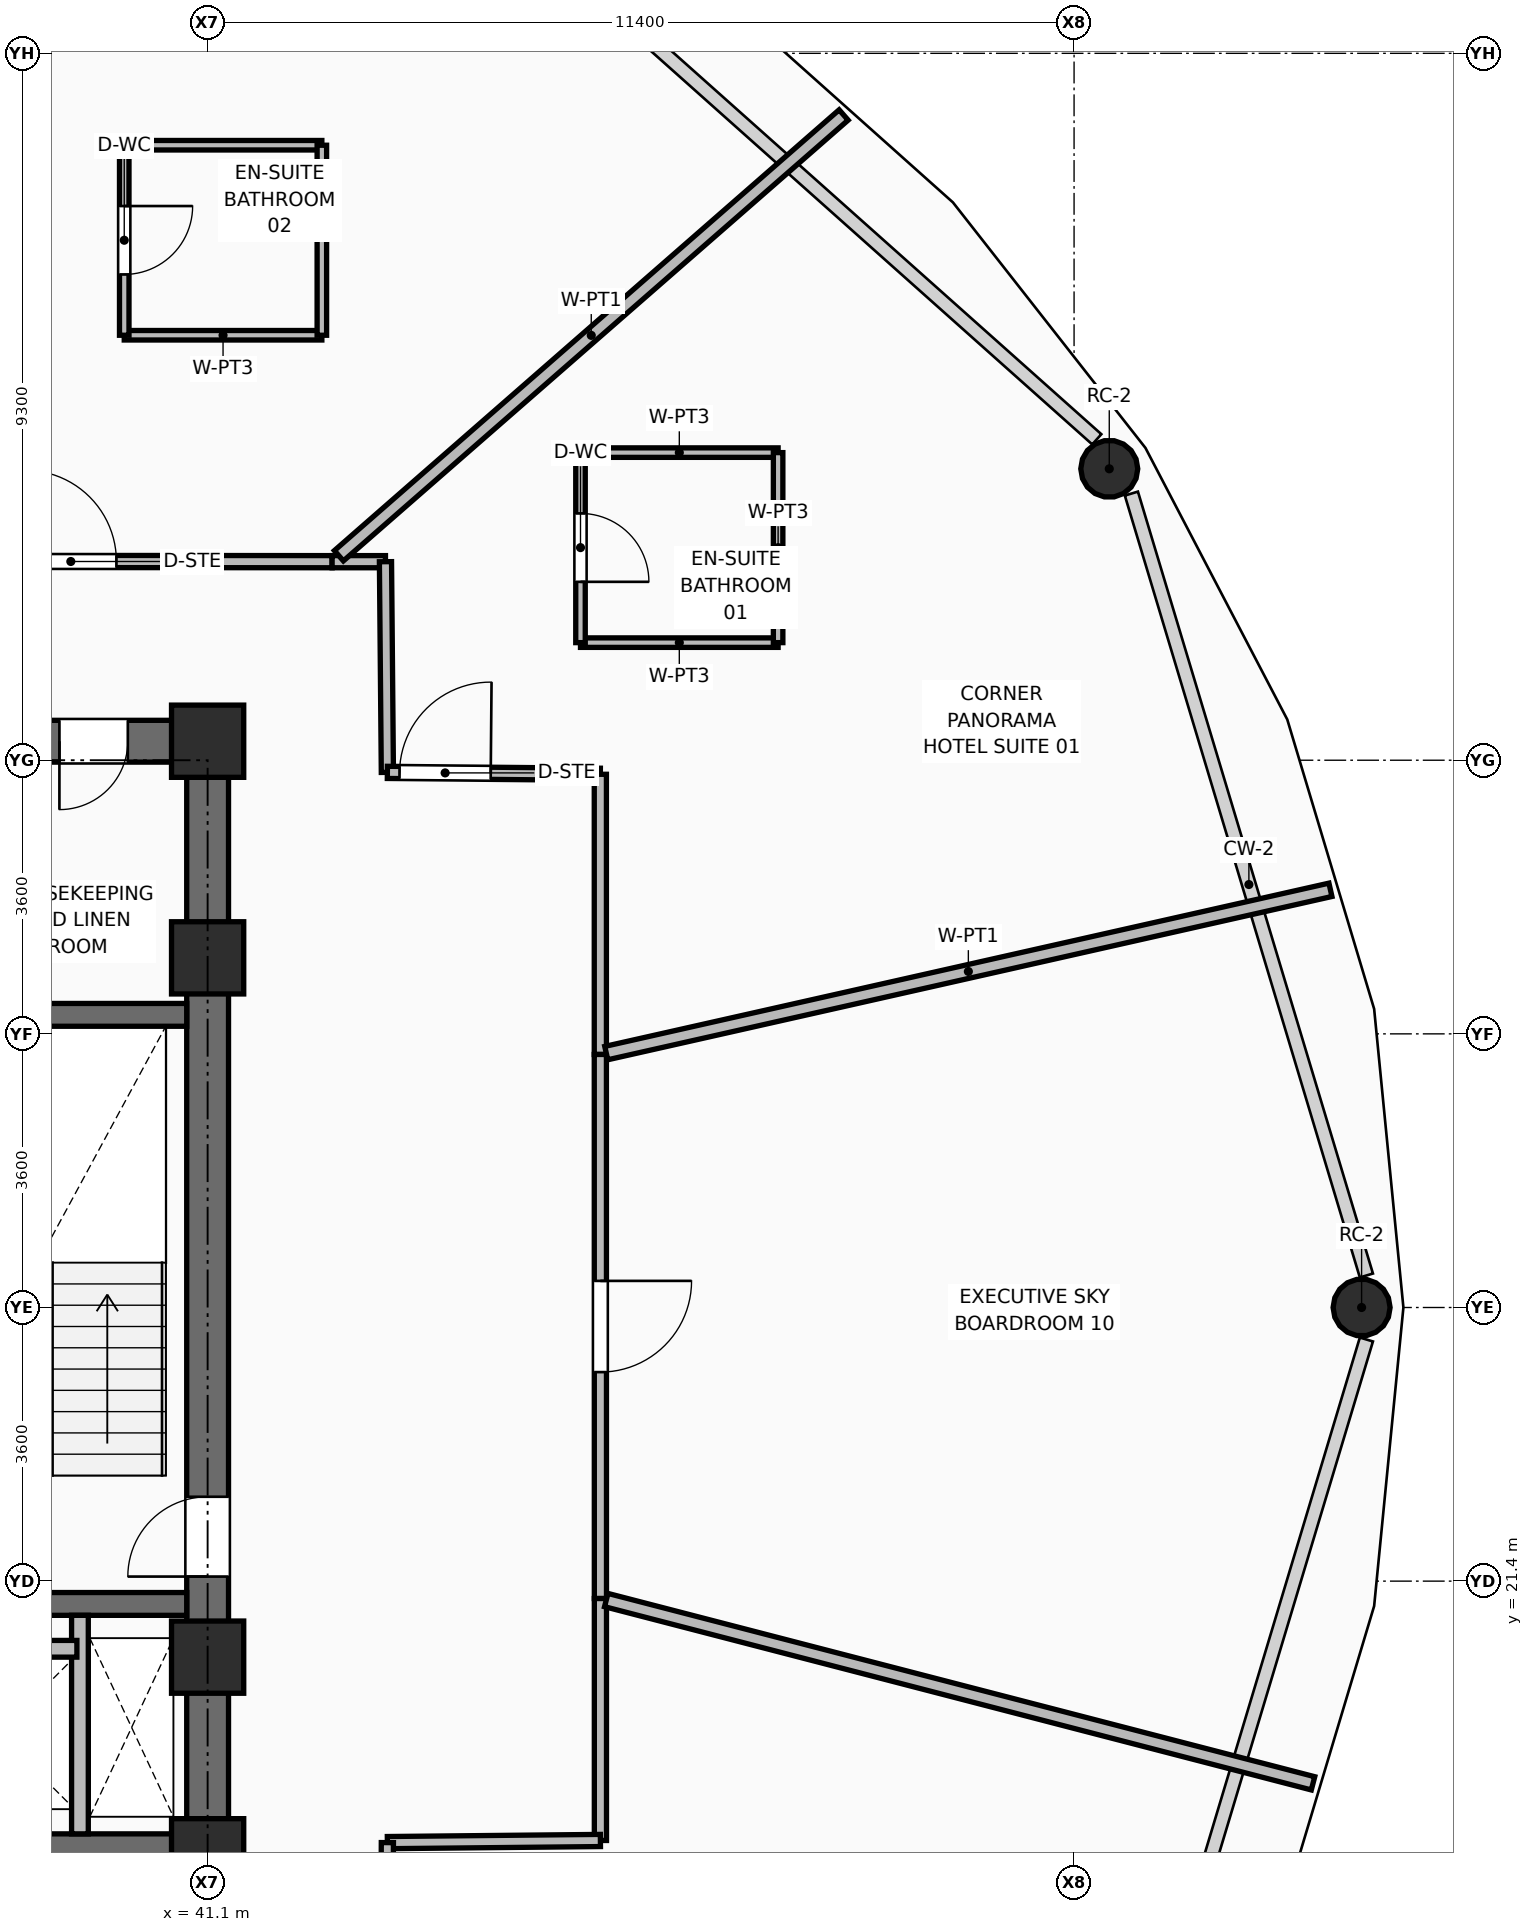
"""IFC4 building model, lengths in metres.
Left out: names, types, materials, properties, quantities, classifications, styles, units other than length and angle.
Written with IfcOpenShell. Run it as: python <this file> out.ifc"""

import sys

from ifc_helpers import new_model, si_unit, direction, frame, frame_2d, origin, origin_2d, place, context, subcontext, project, spatial, rectangle, hollow_circle, extrude, element, fill, save


model = new_model("IFC4")
c1 = context("Model", 3, precision=1e-05, world=origin(), true_north=direction((0.0, 1.0)))
c2 = subcontext(c1, "Body", "Model", "MODEL_VIEW")
j1 = project(units=[si_unit("LENGTHUNIT", "METRE"), si_unit("PLANEANGLEUNIT", "RADIAN")], contexts=[c1])
p1 = place(None, origin())
s1 = spatial("IfcSite", under=j1, at=p1, CompositionType="ELEMENT")
p2 = place(p1, origin())
s2 = spatial("IfcBuilding", under=s1, at=p2, CompositionType="ELEMENT")
p3 = place(p2, frame((0.0, 0.0, 160.95)))
s3 = spatial("IfcBuildingStorey", under=s2, at=p3, CompositionType="ELEMENT", Elevation=160.95)
for number, where, z_axis, x_axis in (
    (1, (41.1, 17.8, 0.0), (0.0, 0.0, 1.0), (1.0, 0.0, 0.0)),
    (2, (41.1, 20.4, 0.0), (0.0, 0.0, 1.0), (1.0, 0.0, 0.0)),
    (3, (41.1, 29.6, 0.0), (0.0, 0.0, 1.0), (1.0, 0.0, 0.0)),
    (4, (41.1, 32.45, 0.0), (0.0, 0.0, 1.0), (1.0, 0.0, 0.0)),
):
    element("IfcColumn", number, at=place(p3, frame(where, z_axis=z_axis, x_axis=x_axis)), inside=s3, PredefinedType="COLUMN", context=c2, shape_type="SweptSolid", body=[
        extrude(rectangle(XDim=0.95, YDim=0.95, at=origin_2d()), origin(), (0.0, 0.0, 1.0), 3.75),
    ])
p4 = place(p3, frame((56.283, 25.0, 0.0), z_axis=(-0.069040907856, 0.0, 0.997613829617), x_axis=(0.0, -1.0, 0.0)))
e5 = element("IfcColumn", 5, at=p4, inside=s3, PredefinedType="COLUMN", context=c2, shape_type="SweptSolid", body=[
    extrude(hollow_circle(Radius=0.375, WallThickness=0.035, at=origin_2d()), origin(), (0.0, 0.0, 1.0), 3.579),
])
p5 = place(p3, frame((52.963, 36.034, 0.0), z_axis=(-0.059770231888, -0.030703886244, 0.997739841216), x_axis=(0.456934981397, -0.88950009712, 0.0)))
e6 = element("IfcColumn", 6, at=p5, inside=s3, PredefinedType="COLUMN", context=c2, shape_type="SweptSolid", body=[
    extrude(hollow_circle(Radius=0.375, WallThickness=0.035, at=origin_2d()), origin(), (0.0, 0.0, 1.0), 3.578),
])
p6 = place(p3, frame((34.95, 17.8, 0.0), z_axis=(0.0, 0.0, 1.0), x_axis=(1.0, 0.0, 0.0)))
e7 = element("IfcWall", 7, at=p6, inside=s3, PredefinedType="SHEAR", context=c2, shape_type="SweptSolid", body=[
    extrude(rectangle(XDim=6.425, YDim=0.55, at=frame_2d((3.212, 0.0))), origin(), (0.0, 0.0, 1.0), 3.57),
])
p7 = place(p3, frame((21.625, 32.45, 0.0), z_axis=(0.0, 0.0, 1.0), x_axis=(1.0, 0.0, 0.0)))
e8 = element("IfcWall", 8, at=p7, inside=s3, PredefinedType="SHEAR", context=c2, shape_type="SweptSolid", body=[
    extrude(rectangle(XDim=19.75, YDim=0.55, at=frame_2d((9.875, 0.0))), origin(), (0.0, 0.0, 1.0), 3.57),
])
p8 = place(p7, frame((2.125, 0.0, 0.0)))
e9 = element("IfcOpeningElement", 9, at=p8, cuts=e8, PredefinedType="OPENING", context=c2, shape_type="SweptSolid", body=[
    extrude(rectangle(XDim=1.1, YDim=2.1, at=frame_2d((0.55, 1.05))), frame((0.0, 0.285, 0.0), z_axis=(0.0, -1.0, 0.0), x_axis=(1.0, 0.0, 0.0)), (0.0, 0.0, 1.0), 0.57),
])
p9 = place(p7, frame((15.515, 0.0, 0.0)))
e10 = element("IfcOpeningElement", 10, at=p9, cuts=e8, PredefinedType="OPENING", context=c2, shape_type="SweptSolid", body=[
    extrude(rectangle(XDim=1.0, YDim=2.1, at=frame_2d((0.5, 1.05))), frame((0.0, 0.285, 0.0), z_axis=(0.0, -1.0, 0.0), x_axis=(1.0, 0.0, 0.0)), (0.0, 0.0, 1.0), 0.57),
])
p10 = place(p7, frame((17.525, 0.0, 0.0)))
e11 = element("IfcOpeningElement", 11, at=p10, cuts=e8, PredefinedType="OPENING", context=c2, shape_type="SweptSolid", body=[
    extrude(rectangle(XDim=0.9, YDim=2.1, at=frame_2d((0.45, 1.05))), frame((0.0, 0.285, 0.0), z_axis=(0.0, -1.0, 0.0), x_axis=(1.0, 0.0, 0.0)), (0.0, 0.0, 1.0), 0.57),
])
p11 = place(p3, frame((41.1, 18.075, 0.0), z_axis=(0.0, 0.0, 1.0), x_axis=(0.0, 1.0, 0.0)))
e12 = element("IfcWall", 12, at=p11, inside=s3, PredefinedType="SHEAR", context=c2, shape_type="SweptSolid", body=[
    extrude(rectangle(XDim=14.1, YDim=0.55, at=frame_2d((7.05, 0.0))), origin(), (0.0, 0.0, 1.0), 3.57),
])
p12 = place(p11, frame((3.385, 0.0, 0.0)))
e13 = element("IfcOpeningElement", 13, at=p12, cuts=e12, PredefinedType="OPENING", context=c2, shape_type="SweptSolid", body=[
    extrude(rectangle(XDim=1.05, YDim=2.1, at=frame_2d((0.525, 1.05))), frame((0.0, 0.285, 0.0), z_axis=(0.0, -1.0, 0.0), x_axis=(1.0, 0.0, 0.0)), (0.0, 0.0, 1.0), 0.57),
])
for number, where, z_axis, x_axis in (
    (14, (37.21, 21.1, 0.0), (0.0, 0.0, 1.0), (1.0, 0.0, 0.0)),
    (15, (37.21, 28.85, 0.0), (0.0, 0.0, 1.0), (1.0, 0.0, 0.0)),
):
    element("IfcWall", number, at=place(p3, frame(where, z_axis=z_axis, x_axis=x_axis)), inside=s3, PredefinedType="SHEAR", context=c2, shape_type="SweptSolid", body=[
        extrude(rectangle(XDim=3.615, YDim=0.3, at=frame_2d((1.808, 0.0))), origin(), (0.0, 0.0, 1.0), 3.57),
    ])
p13 = place(p3, frame((39.42, 18.075, 0.0), z_axis=(0.0, 0.0, 1.0), x_axis=(0.0, 1.0, 0.0)))
e16 = element("IfcWall", 16, at=p13, inside=s3, PredefinedType="PARTITIONING", context=c2, shape_type="SweptSolid", body=[
    extrude(rectangle(XDim=2.875, YDim=0.22, at=frame_2d((1.438, 0.0))), origin(), (0.0, 0.0, 1.0), 3.55),
])
p14 = place(p3, frame((37.14, 20.51, 0.0), z_axis=(0.0, 0.0, 1.0), x_axis=(1.0, 0.0, 0.0)))
e17 = element("IfcWall", 17, at=p14, inside=s3, PredefinedType="PARTITIONING", context=c2, shape_type="SweptSolid", body=[
    extrude(rectangle(XDim=2.24, YDim=0.22, at=frame_2d((1.12, 0.0))), origin(), (0.0, 0.0, 1.0), 3.55),
])
p15 = place(p3, frame((38.54, 34.815, 0.0), z_axis=(0.0, 0.0, 1.0), x_axis=(0.999999756484, -0.00069787712, 0.0)))
e18 = element("IfcWall", 18, at=p15, inside=s3, PredefinedType="PARTITIONING", context=c2, shape_type="SweptSolid", body=[
    extrude(rectangle(XDim=4.198, YDim=0.16, at=frame_2d((2.099, 0.0))), origin(), (0.0, 0.0, 1.0), 3.006),
])
p16 = place(p15, frame((0.16, 0.0, 0.0)))
e19 = element("IfcOpeningElement", 19, at=p16, cuts=e18, PredefinedType="OPENING", context=c2, shape_type="SweptSolid", body=[
    extrude(rectangle(XDim=1.2, YDim=2.1, at=frame_2d((0.6, 1.05))), frame((0.0, 0.09, 0.0), z_axis=(0.0, -1.0, 0.0), x_axis=(1.0, 0.0, 0.0)), (0.0, 0.0, 1.0), 0.18),
])
p17 = place(p3, frame((42.738, 34.812, 0.0), z_axis=(0.0, 0.0, 1.0), x_axis=(1.0, 0.0, 0.0)))
e20 = element("IfcWall", 20, at=p17, inside=s3, PredefinedType="PARTITIONING", context=c2, shape_type="SweptSolid", body=[
    extrude(rectangle(XDim=0.702, YDim=0.16, at=frame_2d((0.351, 0.0))), origin(), (0.0, 0.0, 1.0), 3.55),
])
p18 = place(p3, frame((43.44, 34.812, 0.0), z_axis=(0.0, 0.0, 1.0), x_axis=(0.009071319538, -0.999958854734, 0.0)))
e21 = element("IfcWall", 21, at=p18, inside=s3, PredefinedType="PARTITIONING", context=c2, shape_type="SweptSolid", body=[
    extrude(rectangle(XDim=2.772, YDim=0.16, at=frame_2d((1.386, 0.0))), origin(), (0.0, 0.0, 1.0), 3.006),
])
p19 = place(p3, frame((43.465, 32.04, 0.0), z_axis=(0.0, 0.0, 1.0), x_axis=(0.99995973187, -0.008974109295, 0.0)))
e22 = element("IfcWall", 22, at=p19, inside=s3, PredefinedType="PARTITIONING", context=c2, shape_type="SweptSolid", body=[
    extrude(rectangle(XDim=2.802, YDim=0.16, at=frame_2d((1.401, 0.0))), origin(), (0.0, 0.0, 1.0), 3.55),
])
p20 = place(p19, frame((0.16, 0.0, 0.0)))
e23 = element("IfcOpeningElement", 23, at=p20, cuts=e22, PredefinedType="OPENING", context=c2, shape_type="SweptSolid", body=[
    extrude(rectangle(XDim=1.2, YDim=2.1, at=frame_2d((0.6, 1.05))), frame((0.0, 0.09, 0.0), z_axis=(0.0, -1.0, 0.0), x_axis=(1.0, 0.0, 0.0)), (0.0, 0.0, 1.0), 0.18),
])
p21 = place(p3, frame((46.267, 32.015, 0.0), z_axis=(0.0, 0.0, 1.0), x_axis=(0.0, -1.0, 0.0)))
e24 = element("IfcWall", 24, at=p21, inside=s3, PredefinedType="PARTITIONING", context=c2, shape_type="SweptSolid", body=[
    extrude(rectangle(XDim=3.686, YDim=0.16, at=frame_2d((1.843, 0.0))), origin(), (0.0, 0.0, 1.0), 3.55),
])
p22 = place(p3, frame((46.267, 28.329, 0.0), z_axis=(0.0, 0.0, 1.0), x_axis=(0.000136425647, -0.999999990694, 0.0)))
e25 = element("IfcWall", 25, at=p22, inside=s3, PredefinedType="PARTITIONING", context=c2, shape_type="SweptSolid", body=[
    extrude(rectangle(XDim=7.158, YDim=0.16, at=frame_2d((3.579, 0.0))), origin(), (0.0, 0.0, 1.0), 3.006),
])
p23 = place(p22, frame((2.979, 0.0, 0.0)))
e26 = element("IfcOpeningElement", 26, at=p23, cuts=e25, PredefinedType="OPENING", context=c2, shape_type="SweptSolid", body=[
    extrude(rectangle(XDim=1.2, YDim=2.1, at=frame_2d((0.6, 1.05))), frame((0.0, 0.09, 0.0), z_axis=(0.0, -1.0, 0.0), x_axis=(1.0, 0.0, 0.0)), (0.0, 0.0, 1.0), 0.18),
])
p24 = place(p3, frame((46.268, 21.171, 0.0), z_axis=(0.0, 0.0, 1.0), x_axis=(0.0, -1.0, 0.0)))
e27 = element("IfcWall", 27, at=p24, inside=s3, PredefinedType="PARTITIONING", context=c2, shape_type="SweptSolid", body=[
    extrude(rectangle(XDim=3.183, YDim=0.16, at=frame_2d((1.591, 0.0))), origin(), (0.0, 0.0, 1.0), 3.55),
])
p25 = place(p3, frame((46.268, 17.988, 0.0), z_axis=(0.0, 0.0, 1.0), x_axis=(-0.999949838147, -0.010016046632, 0.0)))
e28 = element("IfcWall", 28, at=p25, inside=s3, PredefinedType="PARTITIONING", context=c2, shape_type="SweptSolid", body=[
    extrude(rectangle(XDim=2.803, YDim=0.16, at=frame_2d((1.402, 0.0))), origin(), (0.0, 0.0, 1.0), 3.55),
])
p26 = place(p3, frame((43.465, 17.96, 0.0), z_axis=(0.0, 0.0, 1.0), x_axis=(-0.005599676426, -0.999984321689, 0.0)))
e29 = element("IfcWall", 29, at=p26, inside=s3, PredefinedType="PARTITIONING", context=c2, shape_type="SweptSolid", body=[
    extrude(rectangle(XDim=4.142, YDim=0.16, at=frame_2d((2.071, 0.0))), origin(), (0.0, 0.0, 1.0), 3.006),
])
p27 = place(p26, frame((0.16, 0.0, 0.0)))
e30 = element("IfcOpeningElement", 30, at=p27, cuts=e29, PredefinedType="OPENING", context=c2, shape_type="SweptSolid", body=[
    extrude(rectangle(XDim=1.2, YDim=2.1, at=frame_2d((0.6, 1.05))), frame((0.0, 0.09, 0.0), z_axis=(0.0, -1.0, 0.0), x_axis=(1.0, 0.0, 0.0)), (0.0, 0.0, 1.0), 0.18),
])
p28 = place(p3, frame((46.345, 28.347, 0.0), z_axis=(0.0, 0.0, 1.0), x_axis=(0.975513709094, 0.219938635466, 0.0)))
e31 = element("IfcWall", 31, at=p28, inside=s3, PredefinedType="PARTITIONING", context=c2, shape_type="SweptSolid", body=[
    extrude(rectangle(XDim=9.767, YDim=0.18, at=frame_2d((4.884, 0.0))), origin(), (0.0, 0.0, 1.0), 2.852),
])
p29 = place(p3, frame((42.827, 34.89, 0.0), z_axis=(0.0, 0.0, 1.0), x_axis=(0.753245296601, 0.657739707748, 0.0)))
e32 = element("IfcWall", 32, at=p29, inside=s3, PredefinedType="PARTITIONING", context=c2, shape_type="SweptSolid", body=[
    extrude(rectangle(XDim=8.817, YDim=0.18, at=frame_2d((4.408, 0.0))), origin(), (0.0, 0.0, 1.0), 2.852),
])
p30 = place(p3, frame((46.345, 21.151, 0.0), z_axis=(0.0, 0.0, 1.0), x_axis=(0.967996440842, -0.250963922742, 0.0)))
e33 = element("IfcWall", 33, at=p30, inside=s3, PredefinedType="PARTITIONING", context=c2, shape_type="SweptSolid", body=[
    extrude(rectangle(XDim=9.606, YDim=0.18, at=frame_2d((4.803, 0.0))), origin(), (0.0, 0.0, 1.0), 2.852),
])
p31 = place(p3, frame((46.006, 33.747, 0.0), z_axis=(0.0, 0.0, 1.0), x_axis=(1.0, 0.0, 0.0)))
e34 = element("IfcWall", 34, at=p31, inside=s3, PredefinedType="PARTITIONING", context=c2, shape_type="SweptSolid", body=[
    extrude(rectangle(XDim=2.6, YDim=0.125, at=frame_2d((1.3, 0.0))), origin(), (0.0, 0.0, 1.0), 3.006),
])
p32 = place(p3, frame((46.006, 36.247, 0.0), z_axis=(0.0, 0.0, 1.0), x_axis=(1.0, 0.0, 0.0)))
e35 = element("IfcWall", 35, at=p32, inside=s3, PredefinedType="PARTITIONING", context=c2, shape_type="SweptSolid", body=[
    extrude(rectangle(XDim=2.6, YDim=0.125, at=frame_2d((1.3, 0.0))), origin(), (0.0, 0.0, 1.0), 3.55),
])
p33 = place(p3, frame((46.006, 33.747, 0.0), z_axis=(0.0, 0.0, 1.0), x_axis=(0.0, 1.0, 0.0)))
e36 = element("IfcWall", 36, at=p33, inside=s3, PredefinedType="PARTITIONING", context=c2, shape_type="SweptSolid", body=[
    extrude(rectangle(XDim=2.5, YDim=0.125, at=frame_2d((1.25, 0.0))), origin(), (0.0, 0.0, 1.0), 3.006),
])
p34 = place(p33, frame((0.8, 0.0, 0.0)))
e37 = element("IfcOpeningElement", 37, at=p34, cuts=e36, PredefinedType="OPENING", context=c2, shape_type="SweptSolid", body=[
    extrude(rectangle(XDim=0.9, YDim=2.1, at=frame_2d((0.45, 1.05))), frame((0.0, 0.073, 0.0), z_axis=(0.0, -1.0, 0.0), x_axis=(1.0, 0.0, 0.0)), (0.0, 0.0, 1.0), 0.145),
])
p35 = place(p3, frame((48.606, 33.747, 0.0), z_axis=(0.0, 0.0, 1.0), x_axis=(0.0, 1.0, 0.0)))
e38 = element("IfcWall", 38, at=p35, inside=s3, PredefinedType="PARTITIONING", context=c2, shape_type="SweptSolid", body=[
    extrude(rectangle(XDim=2.5, YDim=0.125, at=frame_2d((1.25, 0.0))), origin(), (0.0, 0.0, 1.0), 3.006),
])
p36 = place(p3, frame((40.003, 37.791, 0.0), z_axis=(0.0, 0.0, 1.0), x_axis=(1.0, 0.0, 0.0)))
e39 = element("IfcWall", 39, at=p36, inside=s3, PredefinedType="PARTITIONING", context=c2, shape_type="SweptSolid", body=[
    extrude(rectangle(XDim=2.6, YDim=0.125, at=frame_2d((1.3, 0.0))), origin(), (0.0, 0.0, 1.0), 3.006),
])
p37 = place(p3, frame((40.003, 40.291, 0.0), z_axis=(0.0, 0.0, 1.0), x_axis=(1.0, 0.0, 0.0)))
e40 = element("IfcWall", 40, at=p37, inside=s3, PredefinedType="PARTITIONING", context=c2, shape_type="SweptSolid", body=[
    extrude(rectangle(XDim=2.6, YDim=0.125, at=frame_2d((1.3, 0.0))), origin(), (0.0, 0.0, 1.0), 3.55),
])
p38 = place(p3, frame((40.003, 37.791, 0.0), z_axis=(0.0, 0.0, 1.0), x_axis=(0.0, 1.0, 0.0)))
e41 = element("IfcWall", 41, at=p38, inside=s3, PredefinedType="PARTITIONING", context=c2, shape_type="SweptSolid", body=[
    extrude(rectangle(XDim=2.5, YDim=0.125, at=frame_2d((1.25, 0.0))), origin(), (0.0, 0.0, 1.0), 3.55),
])
p39 = place(p38, frame((0.8, 0.0, 0.0)))
e42 = element("IfcOpeningElement", 42, at=p39, cuts=e41, PredefinedType="OPENING", context=c2, shape_type="SweptSolid", body=[
    extrude(rectangle(XDim=0.9, YDim=2.1, at=frame_2d((0.45, 1.05))), frame((0.0, 0.073, 0.0), z_axis=(0.0, -1.0, 0.0), x_axis=(1.0, 0.0, 0.0)), (0.0, 0.0, 1.0), 0.145),
])
p40 = place(p3, frame((42.603, 37.791, 0.0), z_axis=(0.0, 0.0, 1.0), x_axis=(0.0, 1.0, 0.0)))
e43 = element("IfcWall", 43, at=p40, inside=s3, PredefinedType="PARTITIONING", context=c2, shape_type="SweptSolid", body=[
    extrude(rectangle(XDim=2.5, YDim=0.125, at=frame_2d((1.25, 0.0))), origin(), (0.0, 0.0, 1.0), 3.006),
])
p41 = place(p12, origin())
e44 = element("IfcDoor", 44, at=p41, inside=s3, OperationType="SINGLE_SWING_LEFT", PredefinedType="DOOR", context=c2, shape_type="SweptSolid", body=[
    extrude(rectangle(XDim=1.05, YDim=2.1, at=frame_2d((0.525, 1.05))), frame((0.0, 0.025, 0.0), z_axis=(0.0, -1.0, 0.0), x_axis=(1.0, 0.0, 0.0)), (0.0, 0.0, 1.0), 0.05),
])
fill(e13, e44)
p42 = place(p10, frame((0.9, 0.0, 0.0), z_axis=(0.0, 0.0, 1.0), x_axis=(-1.0, 0.0, 0.0)))
e45 = element("IfcDoor", 45, at=p42, inside=s3, OperationType="SINGLE_SWING_RIGHT", PredefinedType="DOOR", context=c2, shape_type="SweptSolid", body=[
    extrude(rectangle(XDim=0.9, YDim=2.1, at=frame_2d((0.45, 1.05))), frame((0.0, 0.025, 0.0), z_axis=(0.0, -1.0, 0.0), x_axis=(1.0, 0.0, 0.0)), (0.0, 0.0, 1.0), 0.05),
])
fill(e11, e45)
p43 = place(p34, frame((0.9, 0.0, 0.0), z_axis=(0.0, 0.0, 1.0), x_axis=(-1.0, 0.0, 0.0)))
e46 = element("IfcDoor", 46, at=p43, inside=s3, OperationType="SINGLE_SWING_RIGHT", PredefinedType="DOOR", context=c2, shape_type="SweptSolid", body=[
    extrude(rectangle(XDim=0.9, YDim=2.1, at=frame_2d((0.45, 1.05))), frame((0.0, 0.025, 0.0), z_axis=(0.0, -1.0, 0.0), x_axis=(1.0, 0.0, 0.0)), (0.0, 0.0, 1.0), 0.05),
])
fill(e37, e46)
p44 = place(p20, origin())
e47 = element("IfcDoor", 47, at=p44, inside=s3, OperationType="SINGLE_SWING_RIGHT", PredefinedType="DOOR", context=c2, shape_type="SweptSolid", body=[
    extrude(rectangle(XDim=1.2, YDim=2.1, at=frame_2d((0.6, 1.05))), frame((0.0, 0.025, 0.0), z_axis=(0.0, -1.0, 0.0), x_axis=(1.0, 0.0, 0.0)), (0.0, 0.0, 1.0), 0.05),
])
fill(e23, e47)
p45 = place(p39, frame((0.9, 0.0, 0.0), z_axis=(0.0, 0.0, 1.0), x_axis=(-1.0, 0.0, 0.0)))
e48 = element("IfcDoor", 48, at=p45, inside=s3, OperationType="SINGLE_SWING_LEFT", PredefinedType="DOOR", context=c2, shape_type="SweptSolid", body=[
    extrude(rectangle(XDim=0.9, YDim=2.1, at=frame_2d((0.45, 1.05))), frame((0.0, 0.025, 0.0), z_axis=(0.0, -1.0, 0.0), x_axis=(1.0, 0.0, 0.0)), (0.0, 0.0, 1.0), 0.05),
])
fill(e42, e48)
p46 = place(p16, origin())
e49 = element("IfcDoor", 49, at=p46, inside=s3, OperationType="SINGLE_SWING_LEFT", PredefinedType="DOOR", context=c2, shape_type="SweptSolid", body=[
    extrude(rectangle(XDim=1.2, YDim=2.1, at=frame_2d((0.6, 1.05))), frame((0.0, 0.025, 0.0), z_axis=(0.0, -1.0, 0.0), x_axis=(1.0, 0.0, 0.0)), (0.0, 0.0, 1.0), 0.05),
])
fill(e19, e49)
p47 = place(p23, origin())
e50 = element("IfcDoor", 50, at=p47, inside=s3, OperationType="SINGLE_SWING_LEFT", PredefinedType="DOOR", context=c2, shape_type="SweptSolid", body=[
    extrude(rectangle(XDim=1.2, YDim=2.1, at=frame_2d((0.6, 1.05))), frame((0.0, 0.025, 0.0), z_axis=(0.0, -1.0, 0.0), x_axis=(1.0, 0.0, 0.0)), (0.0, 0.0, 1.0), 0.05),
])
fill(e26, e50)
save(model, sys.argv[1])
